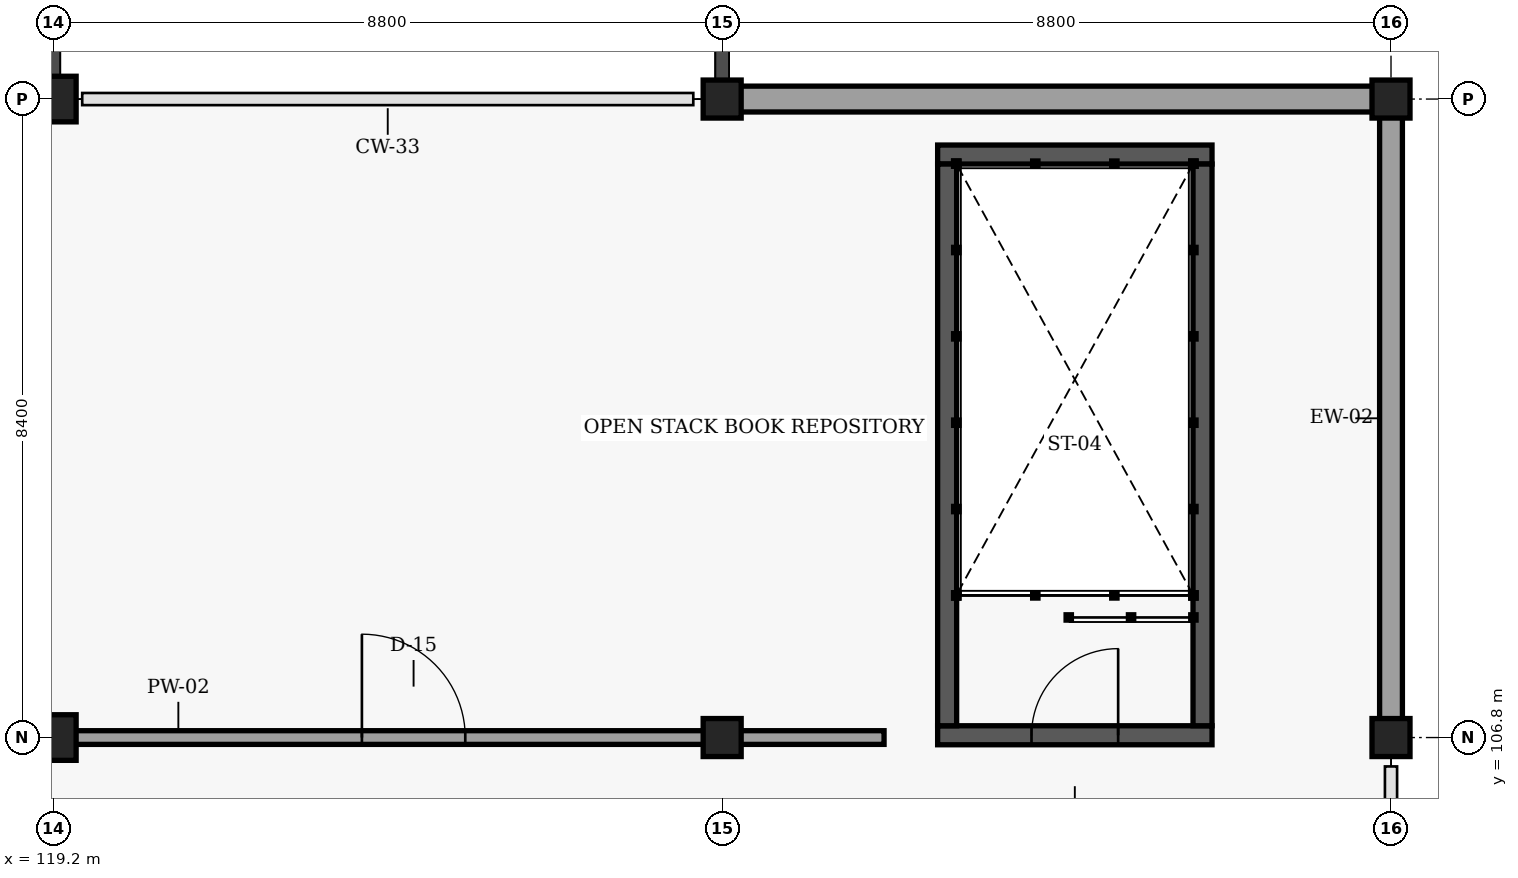
"""IFC4 building model, lengths in metres.
Left out: names, types, materials, properties, quantities, classifications, styles, units other than length and angle.
Written with IfcOpenShell. Run it as: python <this file> out.ifc"""

import sys

from ifc_helpers import new_model, si_unit, direction, frame, frame_2d, origin, origin_2d, place, context, subcontext, project, spatial, rectangle, extrude, element, fill, save


model = new_model("IFC4")
c1 = context("Model", 3, precision=1e-05, world=origin(), true_north=direction((0.0, 1.0)))
c2 = subcontext(c1, "Body", "Model", "MODEL_VIEW")
j1 = project(units=[si_unit("LENGTHUNIT", "METRE"), si_unit("PLANEANGLEUNIT", "RADIAN")], contexts=[c1])
p1 = place(None, origin())
s1 = spatial("IfcSite", under=j1, at=p1, CompositionType="ELEMENT")
p2 = place(p1, origin())
s2 = spatial("IfcBuilding", under=s1, at=p2, CompositionType="ELEMENT")
p3 = place(p2, frame((0.0, 0.0, 12.9)))
s3 = spatial("IfcBuildingStorey", under=s2, at=p3, CompositionType="ELEMENT", Elevation=12.9)
for number, where, z_axis, x_axis in (
    (1, (119.2, 106.8, 0.0), (0.0, 0.0, 1.0), (1.0, 0.0, 0.0)),
    (2, (119.2, 115.2, 0.0), (0.0, 0.0, 1.0), (1.0, 0.0, 0.0)),
):
    element("IfcColumn", number, at=place(p3, frame(where, z_axis=z_axis, x_axis=x_axis)), inside=s3, PredefinedType="COLUMN", context=c2, shape_type="SweptSolid", body=[
        extrude(rectangle(XDim=0.6, YDim=0.6, at=origin_2d()), origin(), (0.0, 0.0, 1.0), 3.6),
    ])
for number, where, z_axis, x_axis in (
    (3, (128.0, 106.8, 0.0), (0.0, 0.0, 1.0), (1.0, 0.0, 0.0)),
    (4, (128.0, 115.2, 0.0), (0.0, 0.0, 1.0), (1.0, 0.0, 0.0)),
    (5, (136.8, 106.8, 0.0), (0.0, 0.0, 1.0), (1.0, 0.0, 0.0)),
    (6, (136.8, 115.2, 0.0), (0.0, 0.0, 1.0), (1.0, 0.0, 0.0)),
):
    element("IfcColumn", number, at=place(p3, frame(where, z_axis=z_axis, x_axis=x_axis)), inside=s3, PredefinedType="COLUMN", context=c2, shape_type="SweptSolid", body=[
        extrude(rectangle(XDim=0.5, YDim=0.5, at=origin_2d()), origin(), (0.0, 0.0, 1.0), 3.6),
    ])
p4 = place(p3, frame((128.1, 115.2, 0.0), z_axis=(0.0, 0.0, 1.0), x_axis=(1.0, 0.0, 0.0)))
e7 = element("IfcWall", 7, at=p4, inside=s3, PredefinedType="SOLIDWALL", context=c2, shape_type="SweptSolid", body=[
    extrude(rectangle(XDim=8.6, YDim=0.34, at=frame_2d((4.3, 0.0))), origin(), (0.0, 0.0, 1.0), 2.885),
])
p5 = place(p3, frame((136.8, 106.9, 0.0), z_axis=(0.0, 0.0, 1.0), x_axis=(0.0, 1.0, 0.0)))
e8 = element("IfcWall", 8, at=p5, inside=s3, PredefinedType="SOLIDWALL", context=c2, shape_type="SweptSolid", body=[
    extrude(rectangle(XDim=8.2, YDim=0.3, at=frame_2d((4.1, 0.0))), origin(), (0.0, 0.0, 1.0), 2.915),
])
p6 = place(p3, frame((134.445, 106.83, 0.0), z_axis=(0.0, 0.0, 1.0), x_axis=(-1.0, 0.0, 0.0)))
e9 = element("IfcWall", 9, at=p6, inside=s3, PredefinedType="SHEAR", context=c2, shape_type="SweptSolid", body=[
    extrude(rectangle(XDim=3.61, YDim=0.25, at=frame_2d((1.805, 0.0))), origin(), (0.0, 0.0, 1.0), 3.38),
])
p7 = place(p6, frame((1.235, 0.0, 0.0)))
e10 = element("IfcOpeningElement", 10, at=p7, cuts=e9, PredefinedType="OPENING", context=c2, shape_type="SweptSolid", body=[
    extrude(rectangle(XDim=1.14, YDim=2.15, at=frame_2d((0.57, 1.075))), frame((0.0, 0.135, 0.0), z_axis=(0.0, -1.0, 0.0), x_axis=(1.0, 0.0, 0.0)), (0.0, 0.0, 1.0), 0.27),
])
p8 = place(p3, frame((130.835, 114.47, 0.0), z_axis=(0.0, 0.0, 1.0), x_axis=(1.0, 0.0, 0.0)))
e11 = element("IfcWall", 11, at=p8, inside=s3, PredefinedType="SHEAR", context=c2, shape_type="SweptSolid", body=[
    extrude(rectangle(XDim=3.61, YDim=0.25, at=frame_2d((1.805, 0.0))), origin(), (0.0, 0.0, 1.0), 3.38),
])
for number, where, z_axis, x_axis in (
    (12, (130.96, 106.955, 0.0), (0.0, 0.0, 1.0), (0.0, 1.0, 0.0)),
    (13, (134.32, 114.345, 0.0), (0.0, 0.0, 1.0), (0.0, -1.0, 0.0)),
):
    element("IfcWall", number, at=place(p3, frame(where, z_axis=z_axis, x_axis=x_axis)), inside=s3, PredefinedType="SHEAR", context=c2, shape_type="SweptSolid", body=[
        extrude(rectangle(XDim=7.39, YDim=0.25, at=frame_2d((3.695, 0.0))), origin(), (0.0, 0.0, 1.0), 3.38),
    ])
p9 = place(p3, frame((117.75, 106.8, 0.0), z_axis=(0.0, 0.0, 1.0), x_axis=(1.0, 0.0, 0.0)))
e14 = element("IfcWall", 14, at=p9, inside=s3, PredefinedType="PARTITIONING", context=c2, shape_type="SweptSolid", body=[
    extrude(rectangle(XDim=12.38, YDim=0.18, at=frame_2d((6.19, 0.0))), origin(), (0.0, 0.0, 1.0), 2.615),
])
p10 = place(p9, frame((5.51, 0.0, 0.0)))
e15 = element("IfcOpeningElement", 15, at=p10, cuts=e14, PredefinedType="OPENING", context=c2, shape_type="SweptSolid", body=[
    extrude(rectangle(XDim=1.36, YDim=2.22, at=frame_2d((0.68, 1.11))), frame((0.0, 0.1, 0.0), z_axis=(0.0, -1.0, 0.0), x_axis=(1.0, 0.0, 0.0)), (0.0, 0.0, 1.0), 0.2),
])
p11 = place(p7, origin())
e16 = element("IfcDoor", 16, at=p11, inside=s3, OperationType="SINGLE_SWING_RIGHT", PredefinedType="DOOR", context=c2, shape_type="SweptSolid", body=[
    extrude(rectangle(XDim=1.14, YDim=2.15, at=frame_2d((0.57, 1.075))), frame((0.0, 0.025, 0.0), z_axis=(0.0, -1.0, 0.0), x_axis=(1.0, 0.0, 0.0)), (0.0, 0.0, 1.0), 0.05),
])
fill(e10, e16)
p12 = place(p10, origin())
e17 = element("IfcDoor", 17, at=p12, inside=s3, OperationType="DOUBLE_DOOR_SINGLE_SWING", PredefinedType="DOOR", context=c2, shape_type="SweptSolid", body=[
    extrude(rectangle(XDim=1.36, YDim=2.22, at=frame_2d((0.68, 1.11))), frame((0.0, 0.025, 0.0), z_axis=(0.0, -1.0, 0.0), x_axis=(1.0, 0.0, 0.0)), (0.0, 0.0, 1.0), 0.05),
])
fill(e15, e17)
save(model, sys.argv[1])
